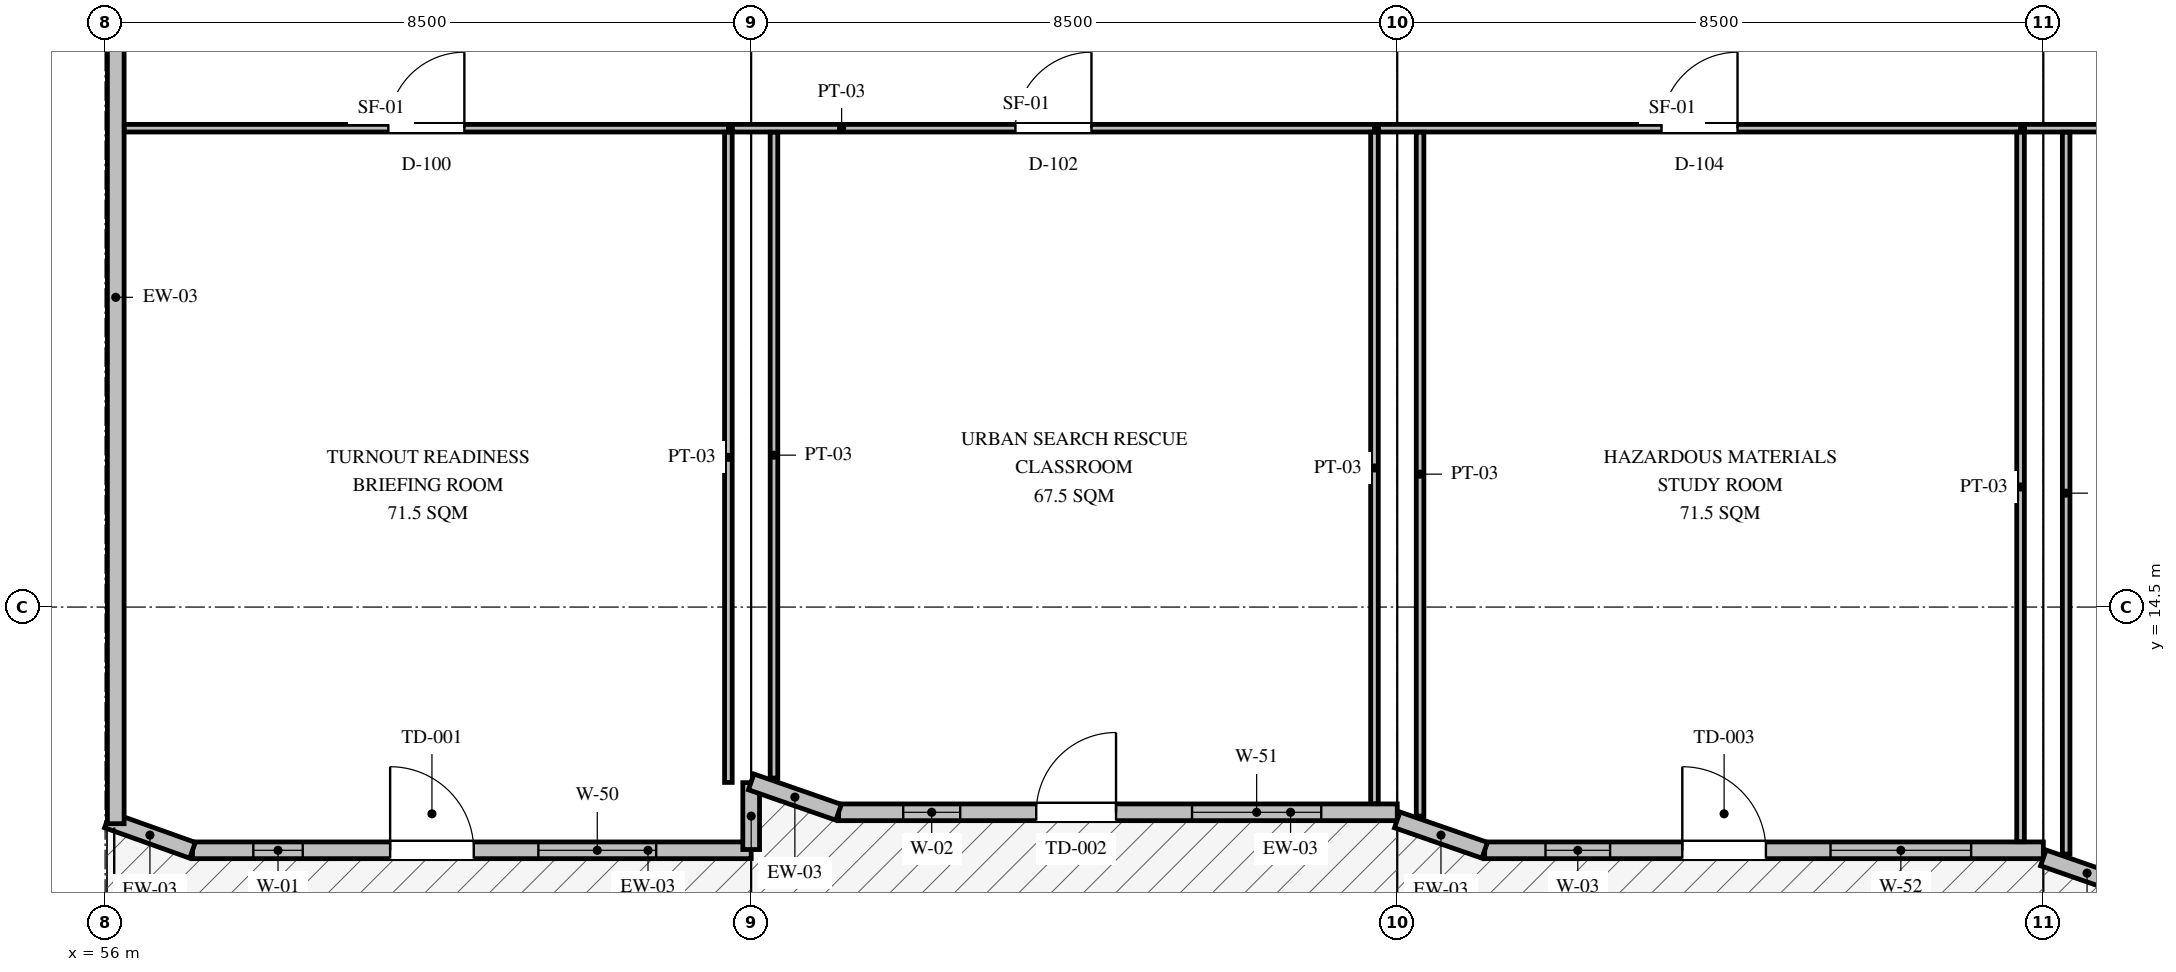
"""IFC4 building model, lengths in metres.
Left out: names, types, materials, properties, quantities, classifications, styles, units other than length and angle.
Written with IfcOpenShell. Run it as: python <this file> out.ifc"""

import sys

from ifc_helpers import new_model, si_unit, direction, frame, frame_2d, origin, place, context, subcontext, project, spatial, polyline, rectangle, outline, extrude, element, fill, save


model = new_model("IFC4")
c1 = context("Model", 3, precision=1e-05, world=origin(), true_north=direction((0.0, 1.0)))
c2 = subcontext(c1, "Body", "Model", "MODEL_VIEW")
j1 = project(units=[si_unit("LENGTHUNIT", "METRE"), si_unit("PLANEANGLEUNIT", "RADIAN")], contexts=[c1])
p1 = place(None, origin())
s1 = spatial("IfcSite", under=j1, at=p1, CompositionType="ELEMENT")
p2 = place(p1, origin())
s2 = spatial("IfcBuilding", under=s1, at=p2, CompositionType="ELEMENT")
p3 = place(p2, frame((0.0, 0.0, 5.85)))
s3 = spatial("IfcBuildingStorey", under=s2, at=p3, CompositionType="ELEMENT", Elevation=5.85)
p4 = place(p3, frame((57.15, 11.3, 0.0), z_axis=(0.0, 0.0, 1.0), x_axis=(1.0, 0.0, 0.0)))
e1 = element("IfcWall", 1, at=p4, inside=s3, PredefinedType="SOLIDWALL", context=c2, shape_type="SweptSolid", body=[
    extrude(rectangle(XDim=7.35, YDim=0.22, at=frame_2d((3.675, 0.0))), origin(), (0.0, 0.0, 1.0), 4.0),
])
p5 = place(p4, frame((2.6, 0.0, 0.0)))
e2 = element("IfcOpeningElement", 2, at=p5, cuts=e1, PredefinedType="OPENING", context=c2, shape_type="SweptSolid", body=[
    extrude(rectangle(XDim=1.1, YDim=2.2, at=frame_2d((0.55, 1.1))), frame((0.0, 0.12, 0.0), z_axis=(0.0, -1.0, 0.0), x_axis=(1.0, 0.0, 0.0)), (0.0, 0.0, 1.0), 0.24),
])
p6 = place(p4, frame((0.8, 0.0, 1.1)))
e3 = element("IfcOpeningElement", 3, at=p6, cuts=e1, PredefinedType="OPENING", context=c2, shape_type="SweptSolid", body=[
    extrude(rectangle(XDim=0.65, YDim=0.65, at=frame_2d((0.325, 0.325))), frame((0.0, 0.12, 0.0), z_axis=(0.0, -1.0, 0.0), x_axis=(1.0, 0.0, 0.0)), (0.0, 0.0, 1.0), 0.24),
])
p7 = place(p4, frame((4.55, 0.0, 1.35)))
e4 = element("IfcOpeningElement", 4, at=p7, cuts=e1, PredefinedType="OPENING", context=c2, shape_type="SweptSolid", body=[
    extrude(rectangle(XDim=1.55, YDim=1.65, at=frame_2d((0.775, 0.825))), frame((0.0, 0.12, 0.0), z_axis=(0.0, -1.0, 0.0), x_axis=(1.0, 0.0, 0.0)), (0.0, 0.0, 1.0), 0.24),
])
p8 = place(p3, frame((56.03, 11.7, 0.0), z_axis=(0.0, 0.0, 1.0), x_axis=(0.941755845838, -0.336297378566, 0.0)))
e5 = element("IfcWall", 5, at=p8, inside=s3, PredefinedType="SOLIDWALL", context=c2, shape_type="SweptSolid", body=[
    extrude(outline(polyline([(0.0, 0.0), (1.189, 0.0), (1.189, 3.95), (0.0, 3.95), (0.0, 0.0)])), frame((0.0, 0.11, 0.0), z_axis=(0.0, -1.0, 0.0), x_axis=(1.0, 0.0, 0.0)), (0.0, 0.0, 1.0), 0.22),
])
p9 = place(p3, frame((64.5, 11.31, 0.0), z_axis=(0.0, 0.0, 1.0), x_axis=(0.0, 1.0, 0.0)))
e6 = element("IfcWall", 6, at=p9, inside=s3, PredefinedType="SOLIDWALL", context=c2, shape_type="SweptSolid", body=[
    extrude(rectangle(XDim=0.88, YDim=0.22, at=frame_2d((0.44, 0.0))), origin(), (0.0, 0.0, 1.0), 3.59),
])
p10 = place(p3, frame((65.65, 11.8, 0.0), z_axis=(0.0, 0.0, 1.0), x_axis=(1.0, 0.0, 0.0)))
e7 = element("IfcWall", 7, at=p10, inside=s3, PredefinedType="SOLIDWALL", context=c2, shape_type="SweptSolid", body=[
    extrude(outline(polyline([(0.0, 0.0), (7.35, 0.0), (7.35, 3.95), (2.42, 10.02), (0.0, 3.95), (0.0, 0.0)])), frame((0.0, 0.11, 0.0), z_axis=(0.0, -1.0, 0.0), x_axis=(1.0, 0.0, 0.0)), (0.0, 0.0, 1.0), 0.22),
])
p11 = place(p10, frame((2.6, 0.0, 0.0)))
e8 = element("IfcOpeningElement", 8, at=p11, cuts=e7, PredefinedType="OPENING", context=c2, shape_type="SweptSolid", body=[
    extrude(rectangle(XDim=1.05, YDim=2.15, at=frame_2d((0.525, 1.075))), frame((0.0, 0.12, 0.0), z_axis=(0.0, -1.0, 0.0), x_axis=(1.0, 0.0, 0.0)), (0.0, 0.0, 1.0), 0.24),
])
p12 = place(p10, frame((0.85, 0.0, 1.1)))
e9 = element("IfcOpeningElement", 9, at=p12, cuts=e7, PredefinedType="OPENING", context=c2, shape_type="SweptSolid", body=[
    extrude(rectangle(XDim=0.75, YDim=0.75, at=frame_2d((0.375, 0.375))), frame((0.0, 0.12, 0.0), z_axis=(0.0, -1.0, 0.0), x_axis=(1.0, 0.0, 0.0)), (0.0, 0.0, 1.0), 0.24),
])
p13 = place(p10, frame((4.65, 0.0, 1.55)))
e10 = element("IfcOpeningElement", 10, at=p13, cuts=e7, PredefinedType="OPENING", context=c2, shape_type="SweptSolid", body=[
    extrude(rectangle(XDim=1.7, YDim=1.65, at=frame_2d((0.85, 0.825))), frame((0.0, 0.12, 0.0), z_axis=(0.0, -1.0, 0.0), x_axis=(1.0, 0.0, 0.0)), (0.0, 0.0, 1.0), 0.24),
])
p14 = place(p3, frame((64.5, 12.2, 0.0), z_axis=(0.0, 0.0, 1.0), x_axis=(0.944513027611, -0.328473957373, 0.0)))
e11 = element("IfcWall", 11, at=p14, inside=s3, PredefinedType="SOLIDWALL", context=c2, shape_type="SweptSolid", body=[
    extrude(outline(polyline([(0.0, 0.0), (1.218, 0.0), (1.218, 3.95), (0.0, 3.95), (0.0, 0.0)])), frame((0.0, 0.11, 0.0), z_axis=(0.0, -1.0, 0.0), x_axis=(1.0, 0.0, 0.0)), (0.0, 0.0, 1.0), 0.22),
])
p15 = place(p3, frame((74.15, 11.3, 0.0), z_axis=(0.0, 0.0, 1.0), x_axis=(1.0, 0.0, 0.0)))
e12 = element("IfcWall", 12, at=p15, inside=s3, PredefinedType="SOLIDWALL", context=c2, shape_type="SweptSolid", body=[
    extrude(rectangle(XDim=7.35, YDim=0.22, at=frame_2d((3.675, 0.0))), origin(), (0.0, 0.0, 1.0), 4.0),
])
p16 = place(p15, frame((2.6, 0.0, 0.0)))
e13 = element("IfcOpeningElement", 13, at=p16, cuts=e12, PredefinedType="OPENING", context=c2, shape_type="SweptSolid", body=[
    extrude(rectangle(XDim=1.1, YDim=2.2, at=frame_2d((0.55, 1.1))), frame((0.0, 0.12, 0.0), z_axis=(0.0, -1.0, 0.0), x_axis=(1.0, 0.0, 0.0)), (0.0, 0.0, 1.0), 0.24),
])
p17 = place(p15, frame((0.8, 0.0, 1.1)))
e14 = element("IfcOpeningElement", 14, at=p17, cuts=e12, PredefinedType="OPENING", context=c2, shape_type="SweptSolid", body=[
    extrude(rectangle(XDim=0.85, YDim=0.85, at=frame_2d((0.425, 0.425))), frame((0.0, 0.12, 0.0), z_axis=(0.0, -1.0, 0.0), x_axis=(1.0, 0.0, 0.0)), (0.0, 0.0, 1.0), 0.24),
])
p18 = place(p15, frame((4.55, 0.0, 1.35)))
e15 = element("IfcOpeningElement", 15, at=p18, cuts=e12, PredefinedType="OPENING", context=c2, shape_type="SweptSolid", body=[
    extrude(rectangle(XDim=1.85, YDim=1.65, at=frame_2d((0.925, 0.825))), frame((0.0, 0.12, 0.0), z_axis=(0.0, -1.0, 0.0), x_axis=(1.0, 0.0, 0.0)), (0.0, 0.0, 1.0), 0.24),
])
for number, where, z_axis, x_axis in (
    (16, (73.0, 11.7, 0.0), (0.0, 0.0, 1.0), (0.945, -0.328, 0.0)),
    (17, (81.5, 11.2, 0.0), (0.0, 0.0, 1.0), (0.945, -0.328, 0.0)),
):
    element("IfcWall", number, at=place(p3, frame(where, z_axis=z_axis, x_axis=x_axis)), inside=s3, PredefinedType="SOLIDWALL", context=c2, shape_type="SweptSolid", body=[
        extrude(outline(polyline([(0.0, 0.0), (1.218, 0.0), (1.218, 3.95), (0.0, 3.95), (0.0, 0.0)])), frame((0.0, 0.11, 0.0), z_axis=(0.0, -1.0, 0.0), x_axis=(1.0, 0.0, 0.0)), (0.0, 0.0, 1.0), 0.22),
    ])
p19 = place(p3, frame((56.14, 11.65, 0.0), z_axis=(0.0, 0.0, 1.0), x_axis=(0.0, 1.0, 0.0)))
e18 = element("IfcWall", 18, at=p19, inside=s3, PredefinedType="SOLIDWALL", context=c2, shape_type="SweptSolid", body=[
    extrude(rectangle(XDim=23.575, YDim=0.22, at=frame_2d((11.788, 0.0))), origin(), (0.0, 0.0, 1.0), 3.594),
])
p20 = place(p3, frame((56.253, 20.8, 0.0), z_axis=(0.0, 0.0, 1.0), x_axis=(1.0, 0.0, 0.0)))
e19 = element("IfcWall", 19, at=p20, inside=s3, PredefinedType="PARTITIONING", context=c2, shape_type="SweptSolid", body=[
    extrude(rectangle(XDim=7.947, YDim=0.1, at=frame_2d((3.974, 0.0))), origin(), (0.0, 0.0, 1.0), 3.544),
])
p21 = place(p20, frame((3.473, 0.0, 0.0)))
e20 = element("IfcOpeningElement", 20, at=p21, cuts=e19, PredefinedType="OPENING", context=c2, shape_type="SweptSolid", body=[
    extrude(rectangle(XDim=1.0, YDim=2.1, at=frame_2d((0.5, 1.05))), frame((0.0, 0.06, 0.0), z_axis=(0.0, -1.0, 0.0), x_axis=(1.0, 0.0, 0.0)), (0.0, 0.0, 1.0), 0.12),
])
p22 = place(p3, frame((64.2, 12.193, 0.0), z_axis=(0.0, 0.0, 1.0), x_axis=(0.0, 1.0, 0.0)))
e21 = element("IfcWall", 21, at=p22, inside=s3, PredefinedType="PARTITIONING", context=c2, shape_type="SweptSolid", body=[
    extrude(rectangle(XDim=8.554, YDim=0.1, at=frame_2d((4.277, 0.0))), origin(), (0.0, 0.0, 1.0), 3.594),
])
p23 = place(p3, frame((64.253, 20.8, 0.0), z_axis=(0.0, 0.0, 1.0), x_axis=(1.0, 0.0, 0.0)))
e22 = element("IfcWall", 22, at=p23, inside=s3, PredefinedType="PARTITIONING", context=c2, shape_type="SweptSolid", body=[
    extrude(rectangle(XDim=8.447, YDim=0.1, at=frame_2d((4.224, 0.0))), origin(), (0.0, 0.0, 1.0), 3.544),
])
p24 = place(p23, frame((3.723, 0.0, 0.0)))
e23 = element("IfcOpeningElement", 23, at=p24, cuts=e22, PredefinedType="OPENING", context=c2, shape_type="SweptSolid", body=[
    extrude(rectangle(XDim=1.0, YDim=2.1, at=frame_2d((0.5, 1.05))), frame((0.0, 0.06, 0.0), z_axis=(0.0, -1.0, 0.0), x_axis=(1.0, 0.0, 0.0)), (0.0, 0.0, 1.0), 0.12),
])
p25 = place(p3, frame((64.8, 12.25, 0.0), z_axis=(0.0, 0.0, 1.0), x_axis=(0.0, 1.0, 0.0)))
e24 = element("IfcWall", 24, at=p25, inside=s3, PredefinedType="PARTITIONING", context=c2, shape_type="SweptSolid", body=[
    extrude(rectangle(XDim=8.497, YDim=0.1, at=frame_2d((4.249, 0.0))), origin(), (0.0, 0.0, 1.0), 3.594),
])
p26 = place(p3, frame((72.7, 11.913, 0.0), z_axis=(0.0, 0.0, 1.0), x_axis=(0.0, 1.0, 0.0)))
e25 = element("IfcWall", 25, at=p26, inside=s3, PredefinedType="PARTITIONING", context=c2, shape_type="SweptSolid", body=[
    extrude(rectangle(XDim=8.834, YDim=0.1, at=frame_2d((4.417, 0.0))), origin(), (0.0, 0.0, 1.0), 3.594),
])
p27 = place(p3, frame((72.753, 20.8, 0.0), z_axis=(0.0, 0.0, 1.0), x_axis=(1.0, 0.0, 0.0)))
e26 = element("IfcWall", 26, at=p27, inside=s3, PredefinedType="PARTITIONING", context=c2, shape_type="SweptSolid", body=[
    extrude(rectangle(XDim=8.447, YDim=0.1, at=frame_2d((4.224, 0.0))), origin(), (0.0, 0.0, 1.0), 3.544),
])
p28 = place(p27, frame((3.723, 0.0, 0.0)))
e27 = element("IfcOpeningElement", 27, at=p28, cuts=e26, PredefinedType="OPENING", context=c2, shape_type="SweptSolid", body=[
    extrude(rectangle(XDim=1.0, YDim=2.1, at=frame_2d((0.5, 1.05))), frame((0.0, 0.06, 0.0), z_axis=(0.0, -1.0, 0.0), x_axis=(1.0, 0.0, 0.0)), (0.0, 0.0, 1.0), 0.12),
])
p29 = place(p3, frame((73.3, 11.75, 0.0), z_axis=(0.0, 0.0, 1.0), x_axis=(0.0, 1.0, 0.0)))
e28 = element("IfcWall", 28, at=p29, inside=s3, PredefinedType="PARTITIONING", context=c2, shape_type="SweptSolid", body=[
    extrude(rectangle(XDim=8.997, YDim=0.1, at=frame_2d((4.499, 0.0))), origin(), (0.0, 0.0, 1.0), 3.594),
])
p30 = place(p3, frame((81.2, 11.413, 0.0), z_axis=(0.0, 0.0, 1.0), x_axis=(0.0, 1.0, 0.0)))
e29 = element("IfcWall", 29, at=p30, inside=s3, PredefinedType="PARTITIONING", context=c2, shape_type="SweptSolid", body=[
    extrude(rectangle(XDim=9.334, YDim=0.1, at=frame_2d((4.667, 0.0))), origin(), (0.0, 0.0, 1.0), 3.594),
])
p31 = place(p3, frame((81.253, 20.8, 0.0), z_axis=(0.0, 0.0, 1.0), x_axis=(1.0, 0.0, 0.0)))
e30 = element("IfcWall", 30, at=p31, inside=s3, PredefinedType="PARTITIONING", context=c2, shape_type="SweptSolid", body=[
    extrude(rectangle(XDim=8.447, YDim=0.1, at=frame_2d((4.224, 0.0))), origin(), (0.0, 0.0, 1.0), 3.544),
])
p32 = place(p31, frame((3.723, 0.0, 0.0)))
e31 = element("IfcOpeningElement", 31, at=p32, cuts=e30, PredefinedType="OPENING", context=c2, shape_type="SweptSolid", body=[
    extrude(rectangle(XDim=1.0, YDim=2.1, at=frame_2d((0.5, 1.05))), frame((0.0, 0.06, 0.0), z_axis=(0.0, -1.0, 0.0), x_axis=(1.0, 0.0, 0.0)), (0.0, 0.0, 1.0), 0.12),
])
p33 = place(p3, frame((81.8, 11.25, 0.0), z_axis=(0.0, 0.0, 1.0), x_axis=(0.0, 1.0, 0.0)))
e32 = element("IfcWall", 32, at=p33, inside=s3, PredefinedType="PARTITIONING", context=c2, shape_type="SweptSolid", body=[
    extrude(rectangle(XDim=9.497, YDim=0.1, at=frame_2d((4.749, 0.0))), origin(), (0.0, 0.0, 1.0), 3.594),
])
p34 = place(p5, frame((1.1, 0.0, 0.0), z_axis=(0.0, 0.0, 1.0), x_axis=(-1.0, 0.0, 0.0)))
e33 = element("IfcDoor", 33, at=p34, inside=s3, OperationType="SINGLE_SWING_LEFT", PredefinedType="DOOR", context=c2, shape_type="SweptSolid", body=[
    extrude(rectangle(XDim=1.1, YDim=2.2, at=frame_2d((0.55, 1.1))), frame((0.0, 0.025, 0.0), z_axis=(0.0, -1.0, 0.0), x_axis=(1.0, 0.0, 0.0)), (0.0, 0.0, 1.0), 0.05),
])
fill(e2, e33)
p35 = place(p6, origin())
e34 = element("IfcWindow", 34, at=p35, inside=s3, PartitioningType="SINGLE_PANEL", PredefinedType="WINDOW", context=c2, shape_type="SweptSolid", body=[
    extrude(rectangle(XDim=0.65, YDim=0.65, at=frame_2d((0.325, 0.325))), frame((0.0, 0.03, 0.0), z_axis=(0.0, -1.0, 0.0), x_axis=(1.0, 0.0, 0.0)), (0.0, 0.0, 1.0), 0.06),
])
fill(e3, e34)
p36 = place(p7, origin())
e35 = element("IfcWindow", 35, at=p36, inside=s3, PartitioningType="SINGLE_PANEL", PredefinedType="WINDOW", context=c2, shape_type="SweptSolid", body=[
    extrude(rectangle(XDim=1.55, YDim=1.65, at=frame_2d((0.775, 0.825))), frame((0.0, 0.03, 0.0), z_axis=(0.0, -1.0, 0.0), x_axis=(1.0, 0.0, 0.0)), (0.0, 0.0, 1.0), 0.06),
])
fill(e4, e35)
p37 = place(p11, frame((1.05, 0.0, 0.0), z_axis=(0.0, 0.0, 1.0), x_axis=(-1.0, 0.0, 0.0)))
e36 = element("IfcDoor", 36, at=p37, inside=s3, OperationType="SINGLE_SWING_RIGHT", PredefinedType="DOOR", context=c2, shape_type="SweptSolid", body=[
    extrude(rectangle(XDim=1.05, YDim=2.15, at=frame_2d((0.525, 1.075))), frame((0.0, 0.025, 0.0), z_axis=(0.0, -1.0, 0.0), x_axis=(1.0, 0.0, 0.0)), (0.0, 0.0, 1.0), 0.05),
])
fill(e8, e36)
p38 = place(p12, origin())
e37 = element("IfcWindow", 37, at=p38, inside=s3, PartitioningType="SINGLE_PANEL", PredefinedType="WINDOW", context=c2, shape_type="SweptSolid", body=[
    extrude(rectangle(XDim=0.75, YDim=0.75, at=frame_2d((0.375, 0.375))), frame((0.0, 0.03, 0.0), z_axis=(0.0, -1.0, 0.0), x_axis=(1.0, 0.0, 0.0)), (0.0, 0.0, 1.0), 0.06),
])
fill(e9, e37)
p39 = place(p13, origin())
e38 = element("IfcWindow", 38, at=p39, inside=s3, PartitioningType="SINGLE_PANEL", PredefinedType="WINDOW", context=c2, shape_type="SweptSolid", body=[
    extrude(rectangle(XDim=1.7, YDim=1.65, at=frame_2d((0.85, 0.825))), frame((0.0, 0.03, 0.0), z_axis=(0.0, -1.0, 0.0), x_axis=(1.0, 0.0, 0.0)), (0.0, 0.0, 1.0), 0.06),
])
fill(e10, e38)
p40 = place(p16, frame((1.1, 0.0, 0.0), z_axis=(0.0, 0.0, 1.0), x_axis=(-1.0, 0.0, 0.0)))
e39 = element("IfcDoor", 39, at=p40, inside=s3, OperationType="SINGLE_SWING_LEFT", PredefinedType="DOOR", context=c2, shape_type="SweptSolid", body=[
    extrude(rectangle(XDim=1.1, YDim=2.2, at=frame_2d((0.55, 1.1))), frame((0.0, 0.025, 0.0), z_axis=(0.0, -1.0, 0.0), x_axis=(1.0, 0.0, 0.0)), (0.0, 0.0, 1.0), 0.05),
])
fill(e13, e39)
p41 = place(p17, origin())
e40 = element("IfcWindow", 40, at=p41, inside=s3, PartitioningType="SINGLE_PANEL", PredefinedType="WINDOW", context=c2, shape_type="SweptSolid", body=[
    extrude(rectangle(XDim=0.85, YDim=0.85, at=frame_2d((0.425, 0.425))), frame((0.0, 0.03, 0.0), z_axis=(0.0, -1.0, 0.0), x_axis=(1.0, 0.0, 0.0)), (0.0, 0.0, 1.0), 0.06),
])
fill(e14, e40)
p42 = place(p18, origin())
e41 = element("IfcWindow", 41, at=p42, inside=s3, PartitioningType="SINGLE_PANEL", PredefinedType="WINDOW", context=c2, shape_type="SweptSolid", body=[
    extrude(rectangle(XDim=1.85, YDim=1.65, at=frame_2d((0.925, 0.825))), frame((0.0, 0.03, 0.0), z_axis=(0.0, -1.0, 0.0), x_axis=(1.0, 0.0, 0.0)), (0.0, 0.0, 1.0), 0.06),
])
fill(e15, e41)
p43 = place(p21, origin())
e42 = element("IfcDoor", 42, at=p43, inside=s3, OperationType="SINGLE_SWING_RIGHT", PredefinedType="DOOR", context=c2, shape_type="SweptSolid", body=[
    extrude(rectangle(XDim=1.0, YDim=2.1, at=frame_2d((0.5, 1.05))), frame((0.0, 0.025, 0.0), z_axis=(0.0, -1.0, 0.0), x_axis=(1.0, 0.0, 0.0)), (0.0, 0.0, 1.0), 0.05),
])
fill(e20, e42)
p44 = place(p24, origin())
e43 = element("IfcDoor", 43, at=p44, inside=s3, OperationType="SINGLE_SWING_RIGHT", PredefinedType="DOOR", context=c2, shape_type="SweptSolid", body=[
    extrude(rectangle(XDim=1.0, YDim=2.1, at=frame_2d((0.5, 1.05))), frame((0.0, 0.025, 0.0), z_axis=(0.0, -1.0, 0.0), x_axis=(1.0, 0.0, 0.0)), (0.0, 0.0, 1.0), 0.05),
])
fill(e23, e43)
p45 = place(p28, origin())
e44 = element("IfcDoor", 44, at=p45, inside=s3, OperationType="SINGLE_SWING_RIGHT", PredefinedType="DOOR", context=c2, shape_type="SweptSolid", body=[
    extrude(rectangle(XDim=1.0, YDim=2.1, at=frame_2d((0.5, 1.05))), frame((0.0, 0.025, 0.0), z_axis=(0.0, -1.0, 0.0), x_axis=(1.0, 0.0, 0.0)), (0.0, 0.0, 1.0), 0.05),
])
fill(e27, e44)
save(model, sys.argv[1])
